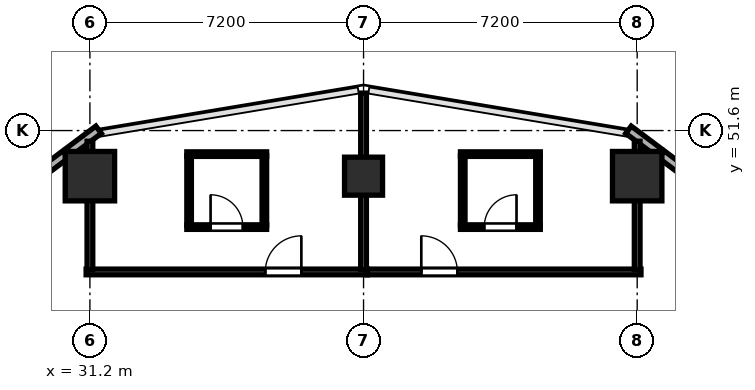
"""IFC4 building model, lengths in metres.
Left out: names, types, materials, properties, quantities, classifications, styles, units other than length and angle.
Written with IfcOpenShell. Run it as: python <this file> out.ifc"""

import sys

from ifc_helpers import new_model, si_unit, direction, frame, frame_2d, origin, origin_2d, place, context, subcontext, project, spatial, rectangle, hollow_rectangle, extrude, element, fill, save


model = new_model("IFC4")
c1 = context("Model", 3, precision=1e-05, world=origin(), true_north=direction((0.0, 1.0)))
c2 = subcontext(c1, "Body", "Model", "MODEL_VIEW")
j1 = project(units=[si_unit("LENGTHUNIT", "METRE"), si_unit("PLANEANGLEUNIT", "RADIAN")], contexts=[c1])
p1 = place(None, origin())
s1 = spatial("IfcSite", under=j1, at=p1, CompositionType="ELEMENT")
p2 = place(p1, origin())
s2 = spatial("IfcBuilding", under=s1, at=p2, CompositionType="ELEMENT")
p3 = place(p2, frame((0.0, 0.0, 24.0)))
s3 = spatial("IfcBuildingStorey", under=s2, at=p3, CompositionType="ELEMENT", Elevation=24.0)
for number, where, z_axis, x_axis in (
    (1, (31.2, 50.4, 0.0), (0.0, 0.0, 1.0), (1.0, 0.0, 0.0)),
    (2, (45.6, 50.4, 0.0), (0.0, 0.0, 1.0), (1.0, 0.0, 0.0)),
):
    element("IfcColumn", number, at=place(p3, frame(where, z_axis=z_axis, x_axis=x_axis)), inside=s3, PredefinedType="COLUMN", context=c2, shape_type="SweptSolid", body=[
        extrude(hollow_rectangle(XDim=1.3, YDim=1.3, WallThickness=0.048, at=origin_2d()), origin(), (0.0, 0.0, 1.0), 3.8),
    ])
p4 = place(p3, frame((38.4, 50.4, -0.26), z_axis=(0.0, 0.0, 1.0), x_axis=(1.0, 0.0, 0.0)))
e3 = element("IfcColumn", 3, at=p4, inside=s3, PredefinedType="COLUMN", context=c2, shape_type="SweptSolid", body=[
    extrude(hollow_rectangle(XDim=1.0, YDim=1.0, WallThickness=0.038, at=origin_2d()), origin(), (0.0, 0.0, 1.0), 4.06),
])
p5 = place(p3, frame((50.324, 47.907, 0.0), z_axis=(0.0, 0.0, 1.0), x_axis=(-0.8, 0.6, 0.0)))
e4 = element("IfcWall", 4, at=p5, inside=s3, PredefinedType="SOLIDWALL", context=c2, shape_type="SweptSolid", body=[
    extrude(rectangle(XDim=5.103, YDim=0.24, at=frame_2d((2.551, 0.0))), origin(), (0.0, 0.0, 1.0), 3.6),
])
p6 = place(p5, frame((1.6, 0.0, 0.85)))
e5 = element("IfcOpeningElement", 5, at=p6, cuts=e4, PredefinedType="OPENING", context=c2, shape_type="SweptSolid", body=[
    extrude(rectangle(XDim=1.2, YDim=1.85, at=frame_2d((0.6, 0.925))), frame((0.0, 0.13, 0.0), z_axis=(0.0, -1.0, 0.0), x_axis=(1.0, 0.0, 0.0)), (0.0, 0.0, 1.0), 0.26),
])
p7 = place(p3, frame((46.144, 51.042, 0.0), z_axis=(0.0, 0.0, 1.0), x_axis=(-0.8, 0.6, 0.0)))
e6 = element("IfcWall", 6, at=p7, inside=s3, PredefinedType="SOLIDWALL", context=c2, shape_type="SweptSolid", body=[
    extrude(rectangle(XDim=0.966, YDim=0.24, at=frame_2d((0.483, 0.0))), origin(), (0.0, 0.0, 1.0), 3.6),
])
p8 = place(p3, frame((31.429, 51.621, 0.0), z_axis=(0.0, 0.0, 1.0), x_axis=(-0.800090996409, -0.599878652284, 0.0)))
e7 = element("IfcWall", 7, at=p8, inside=s3, PredefinedType="SOLIDWALL", context=c2, shape_type="SweptSolid", body=[
    extrude(rectangle(XDim=0.966, YDim=0.24, at=frame_2d((0.483, 0.0))), origin(), (0.0, 0.0, 1.0), 3.6),
])
p9 = place(p3, frame((30.558, 50.969, 0.0), z_axis=(0.0, 0.0, 1.0), x_axis=(-0.8, -0.6, 0.0)))
e8 = element("IfcWall", 8, at=p9, inside=s3, PredefinedType="SOLIDWALL", context=c2, shape_type="SweptSolid", body=[
    extrude(rectangle(XDim=5.103, YDim=0.24, at=frame_2d((2.551, 0.0))), origin(), (0.0, 0.0, 1.0), 3.6),
])
p10 = place(p9, frame((1.6, 0.0, 0.85)))
e9 = element("IfcOpeningElement", 9, at=p10, cuts=e8, PredefinedType="OPENING", context=c2, shape_type="SweptSolid", body=[
    extrude(rectangle(XDim=1.2, YDim=1.85, at=frame_2d((0.6, 0.925))), frame((0.0, 0.13, 0.0), z_axis=(0.0, -1.0, 0.0), x_axis=(1.0, 0.0, 0.0)), (0.0, 0.0, 1.0), 0.26),
])
p11 = place(p3, frame((31.1, 47.88, 0.0), z_axis=(0.0, 0.0, 1.0), x_axis=(1.0, 0.0, 0.0)))
e10 = element("IfcWall", 10, at=p11, inside=s3, PredefinedType="PARTITIONING", context=c2, shape_type="SweptSolid", body=[
    extrude(rectangle(XDim=7.4, YDim=0.15, at=frame_2d((3.7, 0.0))), origin(), (0.0, 0.0, 1.0), 3.6),
])
p12 = place(p11, frame((4.714, 0.0, 0.0)))
e11 = element("IfcOpeningElement", 11, at=p12, cuts=e10, PredefinedType="OPENING", context=c2, shape_type="SweptSolid", body=[
    extrude(rectangle(XDim=0.95, YDim=2.15, at=frame_2d((0.475, 1.075))), frame((0.0, 0.085, 0.0), z_axis=(0.0, -1.0, 0.0), x_axis=(1.0, 0.0, 0.0)), (0.0, 0.0, 1.0), 0.17),
])
p13 = place(p3, frame((31.2, 47.94, 0.0), z_axis=(0.0, 0.0, 1.0), x_axis=(0.0, 1.0, 0.0)))
e12 = element("IfcWall", 12, at=p13, inside=s3, PredefinedType="PARTITIONING", context=c2, shape_type="SweptSolid", body=[
    extrude(rectangle(XDim=3.379, YDim=0.15, at=frame_2d((1.689, 0.0))), origin(), (0.0, 0.0, 1.0), 2.985),
])
p14 = place(p3, frame((38.4, 47.94, 0.0), z_axis=(0.0, 0.0, 1.0), x_axis=(0.0, 1.0, 0.0)))
e13 = element("IfcWall", 13, at=p14, inside=s3, PredefinedType="PARTITIONING", context=c2, shape_type="SweptSolid", body=[
    extrude(rectangle(XDim=4.645, YDim=0.15, at=frame_2d((2.323, 0.0))), origin(), (0.0, 0.0, 1.0), 3.6),
])
p15 = place(p3, frame((33.75, 50.98, 0.0), z_axis=(0.0, 0.0, 1.0), x_axis=(1.0, 0.0, 0.0)))
e14 = element("IfcWall", 14, at=p15, inside=s3, PredefinedType="PARTITIONING", context=c2, shape_type="SweptSolid", body=[
    extrude(rectangle(XDim=2.1, YDim=0.12, at=frame_2d((1.05, 0.0))), origin(), (0.0, 0.0, 1.0), 3.6),
])
p16 = place(p3, frame((33.75, 49.06, 0.0), z_axis=(0.0, 0.0, 1.0), x_axis=(1.0, 0.0, 0.0)))
e15 = element("IfcWall", 15, at=p16, inside=s3, PredefinedType="PARTITIONING", context=c2, shape_type="SweptSolid", body=[
    extrude(rectangle(XDim=2.1, YDim=0.12, at=frame_2d((1.05, 0.0))), origin(), (0.0, 0.0, 1.0), 3.6),
])
p17 = place(p16, frame((0.625, 0.0, 0.0)))
e16 = element("IfcOpeningElement", 16, at=p17, cuts=e15, PredefinedType="OPENING", context=c2, shape_type="SweptSolid", body=[
    extrude(rectangle(XDim=0.85, YDim=2.1, at=frame_2d((0.425, 1.05))), frame((0.0, 0.07, 0.0), z_axis=(0.0, -1.0, 0.0), x_axis=(1.0, 0.0, 0.0)), (0.0, 0.0, 1.0), 0.14),
])
for number, where, z_axis, x_axis in (
    (17, (33.81, 49.105, 0.0), (0.0, 0.0, 1.0), (0.0, 1.0, 0.0)),
    (18, (35.79, 49.105, 0.0), (0.0, 0.0, 1.0), (0.0, 1.0, 0.0)),
):
    element("IfcWall", number, at=place(p3, frame(where, z_axis=z_axis, x_axis=x_axis)), inside=s3, PredefinedType="PARTITIONING", context=c2, shape_type="SweptSolid", body=[
        extrude(rectangle(XDim=1.83, YDim=0.12, at=frame_2d((0.915, 0.0))), origin(), (0.0, 0.0, 1.0), 3.6),
    ])
p18 = place(p3, frame((38.502, 47.88, 0.0), z_axis=(0.0, 0.0, 1.0), x_axis=(1.0, 0.0, 0.0)))
e19 = element("IfcWall", 19, at=p18, inside=s3, PredefinedType="PARTITIONING", context=c2, shape_type="SweptSolid", body=[
    extrude(rectangle(XDim=7.198, YDim=0.15, at=frame_2d((3.599, 0.0))), origin(), (0.0, 0.0, 1.0), 3.6),
])
p19 = place(p18, frame((1.417, 0.0, 0.0)))
e20 = element("IfcOpeningElement", 20, at=p19, cuts=e19, PredefinedType="OPENING", context=c2, shape_type="SweptSolid", body=[
    extrude(rectangle(XDim=0.95, YDim=2.15, at=frame_2d((0.475, 1.075))), frame((0.0, 0.085, 0.0), z_axis=(0.0, -1.0, 0.0), x_axis=(1.0, 0.0, 0.0)), (0.0, 0.0, 1.0), 0.17),
])
p20 = place(p3, frame((45.6, 47.94, 0.0), z_axis=(0.0, 0.0, 1.0), x_axis=(0.0, 1.0, 0.0)))
e21 = element("IfcWall", 21, at=p20, inside=s3, PredefinedType="PARTITIONING", context=c2, shape_type="SweptSolid", body=[
    extrude(rectangle(XDim=3.379, YDim=0.15, at=frame_2d((1.689, 0.0))), origin(), (0.0, 0.0, 1.0), 2.985),
])
p21 = place(p3, frame((40.95, 50.98, 0.0), z_axis=(0.0, 0.0, 1.0), x_axis=(1.0, 0.0, 0.0)))
e22 = element("IfcWall", 22, at=p21, inside=s3, PredefinedType="PARTITIONING", context=c2, shape_type="SweptSolid", body=[
    extrude(rectangle(XDim=2.1, YDim=0.12, at=frame_2d((1.05, 0.0))), origin(), (0.0, 0.0, 1.0), 3.6),
])
p22 = place(p3, frame((40.95, 49.06, 0.0), z_axis=(0.0, 0.0, 1.0), x_axis=(1.0, 0.0, 0.0)))
e23 = element("IfcWall", 23, at=p22, inside=s3, PredefinedType="PARTITIONING", context=c2, shape_type="SweptSolid", body=[
    extrude(rectangle(XDim=2.1, YDim=0.12, at=frame_2d((1.05, 0.0))), origin(), (0.0, 0.0, 1.0), 3.6),
])
p23 = place(p22, frame((0.625, 0.0, 0.0)))
e24 = element("IfcOpeningElement", 24, at=p23, cuts=e23, PredefinedType="OPENING", context=c2, shape_type="SweptSolid", body=[
    extrude(rectangle(XDim=0.85, YDim=2.1, at=frame_2d((0.425, 1.05))), frame((0.0, 0.07, 0.0), z_axis=(0.0, -1.0, 0.0), x_axis=(1.0, 0.0, 0.0)), (0.0, 0.0, 1.0), 0.14),
])
for number, where, z_axis, x_axis in (
    (25, (41.01, 49.105, 0.0), (0.0, 0.0, 1.0), (0.0, 1.0, 0.0)),
    (26, (42.99, 49.105, 0.0), (0.0, 0.0, 1.0), (0.0, 1.0, 0.0)),
):
    element("IfcWall", number, at=place(p3, frame(where, z_axis=z_axis, x_axis=x_axis)), inside=s3, PredefinedType="PARTITIONING", context=c2, shape_type="SweptSolid", body=[
        extrude(rectangle(XDim=1.83, YDim=0.12, at=frame_2d((0.915, 0.0))), origin(), (0.0, 0.0, 1.0), 3.6),
    ])
p24 = place(p12, origin())
e27 = element("IfcDoor", 27, at=p24, inside=s3, OperationType="SINGLE_SWING_RIGHT", PredefinedType="DOOR", context=c2, shape_type="SweptSolid", body=[
    extrude(rectangle(XDim=0.95, YDim=2.15, at=frame_2d((0.475, 1.075))), frame((0.0, 0.025, 0.0), z_axis=(0.0, -1.0, 0.0), x_axis=(1.0, 0.0, 0.0)), (0.0, 0.0, 1.0), 0.05),
])
fill(e11, e27)
p25 = place(p17, origin())
e28 = element("IfcDoor", 28, at=p25, inside=s3, OperationType="SINGLE_SWING_LEFT", PredefinedType="DOOR", context=c2, shape_type="SweptSolid", body=[
    extrude(rectangle(XDim=0.85, YDim=2.1, at=frame_2d((0.425, 1.05))), frame((0.0, 0.025, 0.0), z_axis=(0.0, -1.0, 0.0), x_axis=(1.0, 0.0, 0.0)), (0.0, 0.0, 1.0), 0.05),
])
fill(e16, e28)
p26 = place(p19, origin())
e29 = element("IfcDoor", 29, at=p26, inside=s3, OperationType="SINGLE_SWING_LEFT", PredefinedType="DOOR", context=c2, shape_type="SweptSolid", body=[
    extrude(rectangle(XDim=0.95, YDim=2.15, at=frame_2d((0.475, 1.075))), frame((0.0, 0.025, 0.0), z_axis=(0.0, -1.0, 0.0), x_axis=(1.0, 0.0, 0.0)), (0.0, 0.0, 1.0), 0.05),
])
fill(e20, e29)
p27 = place(p23, origin())
e30 = element("IfcDoor", 30, at=p27, inside=s3, OperationType="SINGLE_SWING_RIGHT", PredefinedType="DOOR", context=c2, shape_type="SweptSolid", body=[
    extrude(rectangle(XDim=0.85, YDim=2.1, at=frame_2d((0.425, 1.05))), frame((0.0, 0.025, 0.0), z_axis=(0.0, -1.0, 0.0), x_axis=(1.0, 0.0, 0.0)), (0.0, 0.0, 1.0), 0.05),
])
fill(e24, e30)
save(model, sys.argv[1])
